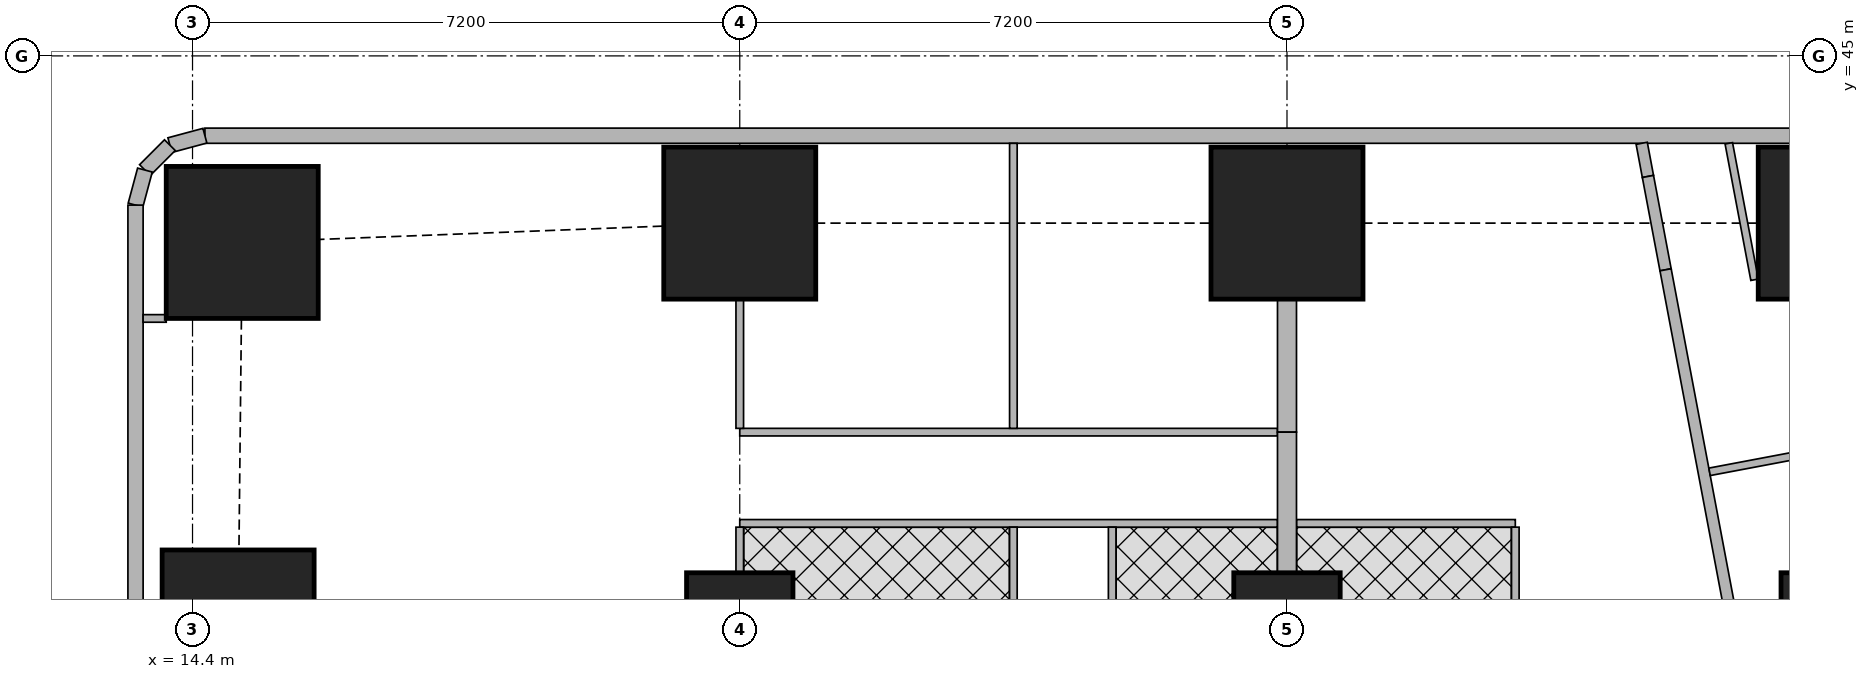
"""IFC4 building model, lengths in metres.
Left out: names, types, materials, properties, quantities, classifications, styles, units other than length and angle.
Written with IfcOpenShell. Run it as: python <this file> out.ifc"""

import sys

from ifc_helpers import new_model, si_unit, direction, frame, frame_2d, origin, origin_2d, place, context, subcontext, project, spatial, rectangle, extrude, element, fill, save


model = new_model("IFC4")
c1 = context("Model", 3, precision=1e-05, world=origin(), true_north=direction((0.0, 1.0)))
c2 = subcontext(c1, "Body", "Model", "MODEL_VIEW")
j1 = project(units=[si_unit("LENGTHUNIT", "METRE"), si_unit("PLANEANGLEUNIT", "RADIAN")], contexts=[c1])
p1 = place(None, origin())
s1 = spatial("IfcSite", under=j1, at=p1, CompositionType="ELEMENT")
p2 = place(p1, origin())
s2 = spatial("IfcBuilding", under=s1, at=p2, CompositionType="ELEMENT")
p3 = place(p2, frame((0.0, 0.0, 274.1)))
s3 = spatial("IfcBuildingStorey", under=s2, at=p3, CompositionType="ELEMENT", Elevation=274.1)
p4 = place(p3, frame((15.0, 37.5, 0.0), z_axis=(0.0, 0.0, 1.0), x_axis=(1.0, 0.0, 0.0)))
e1 = element("IfcColumn", 1, at=p4, inside=s3, PredefinedType="COLUMN", context=c2, shape_type="SweptSolid", body=[
    extrude(rectangle(XDim=2.0, YDim=2.0, at=origin_2d()), origin(), (0.0, 0.0, 1.0), 3.75),
])
for number, where, z_axis, x_axis in (
    (2, (21.6, 37.5, 0.0), (0.0, 0.0, 1.0), (1.0, 0.0, 0.0)),
    (3, (28.8, 37.5, 0.0), (0.0, 0.0, 1.0), (1.0, 0.0, 0.0)),
    (4, (36.0, 37.5, 0.0), (0.0, 0.0, 1.0), (1.0, 0.0, 0.0)),
):
    element("IfcColumn", number, at=place(p3, frame(where, z_axis=z_axis, x_axis=x_axis)), inside=s3, PredefinedType="COLUMN", context=c2, shape_type="SweptSolid", body=[
        extrude(rectangle(XDim=1.4, YDim=1.4, at=origin_2d()), origin(), (0.0, 0.0, 1.0), 3.75),
    ])
for number, where, z_axis, x_axis in (
    (5, (15.054, 42.546, 0.0), (0.0, 0.0, 1.0), (1.0, 0.0, 0.0)),
    (6, (21.6, 42.8, 0.0), (0.0, 0.0, 1.0), (1.0, 0.0, 0.0)),
    (7, (28.8, 42.8, 0.0), (0.0, 0.0, 1.0), (1.0, 0.0, 0.0)),
    (8, (36.0, 42.8, 0.0), (0.0, 0.0, 1.0), (1.0, 0.0, 0.0)),
):
    element("IfcColumn", number, at=place(p3, frame(where, z_axis=z_axis, x_axis=x_axis)), inside=s3, PredefinedType="COLUMN", context=c2, shape_type="SweptSolid", body=[
        extrude(rectangle(XDim=2.0, YDim=2.0, at=origin_2d()), origin(), (0.0, 0.0, 1.0), 3.75),
    ])
p5 = place(p3, frame((42.103, 43.95, 0.0), z_axis=(0.0, 0.0, 1.0), x_axis=(-1.0, 0.0, 0.0)))
e9 = element("IfcWall", 9, at=p5, inside=s3, PredefinedType="SOLIDWALL", context=c2, shape_type="SweptSolid", body=[
    extrude(rectangle(XDim=27.54, YDim=0.2, at=frame_2d((13.77, 0.0))), origin(), (0.0, 0.0, 1.0), 3.5),
])
p6 = place(p5, frame((10.603, 0.0, 0.9)))
e10 = element("IfcOpeningElement", 10, at=p6, cuts=e9, PredefinedType="OPENING", context=c2, shape_type="SweptSolid", body=[
    extrude(rectangle(XDim=1.8, YDim=1.5, at=frame_2d((0.9, 0.75))), frame((0.0, 0.11, 0.0), z_axis=(0.0, -1.0, 0.0), x_axis=(1.0, 0.0, 0.0)), (0.0, 0.0, 1.0), 0.22),
])
p7 = place(p5, frame((14.203, 0.0, 0.9)))
e11 = element("IfcOpeningElement", 11, at=p7, cuts=e9, PredefinedType="OPENING", context=c2, shape_type="SweptSolid", body=[
    extrude(rectangle(XDim=1.8, YDim=1.5, at=frame_2d((0.9, 0.75))), frame((0.0, 0.11, 0.0), z_axis=(0.0, -1.0, 0.0), x_axis=(1.0, 0.0, 0.0)), (0.0, 0.0, 1.0), 0.22),
])
p8 = place(p5, frame((17.803, 0.0, 0.9)))
e12 = element("IfcOpeningElement", 12, at=p8, cuts=e9, PredefinedType="OPENING", context=c2, shape_type="SweptSolid", body=[
    extrude(rectangle(XDim=1.8, YDim=1.5, at=frame_2d((0.9, 0.75))), frame((0.0, 0.11, 0.0), z_axis=(0.0, -1.0, 0.0), x_axis=(1.0, 0.0, 0.0)), (0.0, 0.0, 1.0), 0.22),
])
p9 = place(p5, frame((22.822, 0.0, 0.9)))
e13 = element("IfcOpeningElement", 13, at=p9, cuts=e9, PredefinedType="OPENING", context=c2, shape_type="SweptSolid", body=[
    extrude(rectangle(XDim=2.4, YDim=1.5, at=frame_2d((1.2, 0.75))), frame((0.0, 0.11, 0.0), z_axis=(0.0, -1.0, 0.0), x_axis=(1.0, 0.0, 0.0)), (0.0, 0.0, 1.0), 0.22),
])
p10 = place(p3, frame((14.563, 43.95, 0.0), z_axis=(0.0, 0.0, 1.0), x_axis=(-0.965655254015, -0.259826731483, 0.0)))
e14 = element("IfcWall", 14, at=p10, inside=s3, PredefinedType="SOLIDWALL", context=c2, shape_type="SweptSolid", body=[
    extrude(rectangle(XDim=0.477, YDim=0.2, at=frame_2d((0.239, 0.0))), origin(), (0.0, 0.0, 1.0), 3.5),
])
p11 = place(p3, frame((14.102, 43.826, 0.0), z_axis=(0.0, 0.0, 1.0), x_axis=(-0.707369890659, -0.706843573776, 0.0)))
e15 = element("IfcWall", 15, at=p11, inside=s3, PredefinedType="SOLIDWALL", context=c2, shape_type="SweptSolid", body=[
    extrude(rectangle(XDim=0.464, YDim=0.2, at=frame_2d((0.232, 0.0))), origin(), (0.0, 0.0, 1.0), 3.5),
])
p12 = place(p3, frame((13.774, 43.498, 0.0), z_axis=(0.0, 0.0, 1.0), x_axis=(-0.259826731483, -0.965655254015, 0.0)))
e16 = element("IfcWall", 16, at=p12, inside=s3, PredefinedType="SOLIDWALL", context=c2, shape_type="SweptSolid", body=[
    extrude(rectangle(XDim=0.477, YDim=0.2, at=frame_2d((0.239, 0.0))), origin(), (0.0, 0.0, 1.0), 3.5),
])
p13 = place(p3, frame((13.65, 43.037, 0.0), z_axis=(0.0, 0.0, 1.0), x_axis=(0.0, -1.0, 0.0)))
e17 = element("IfcWall", 17, at=p13, inside=s3, PredefinedType="SOLIDWALL", context=c2, shape_type="SweptSolid", body=[
    extrude(rectangle(XDim=35.374, YDim=0.2, at=frame_2d((17.687, 0.0))), origin(), (0.0, 0.0, 1.0), 3.5),
])
p14 = place(p13, frame((1.959, 0.0, 0.9)))
e18 = element("IfcOpeningElement", 18, at=p14, cuts=e17, PredefinedType="OPENING", context=c2, shape_type="SweptSolid", body=[
    extrude(rectangle(XDim=1.8, YDim=1.5, at=frame_2d((0.9, 0.75))), frame((0.0, 0.11, 0.0), z_axis=(0.0, -1.0, 0.0), x_axis=(1.0, 0.0, 0.0)), (0.0, 0.0, 1.0), 0.22),
])
p15 = place(p3, frame((33.467, 43.85, 0.0), z_axis=(0.0, 0.0, 1.0), x_axis=(0.184886516626, -0.982759877066, 0.0)))
e19 = element("IfcWall", 19, at=p15, inside=s3, PredefinedType="SOLIDWALL", context=c2, shape_type="SweptSolid", body=[
    extrude(rectangle(XDim=0.444, YDim=0.15, at=frame_2d((0.222, 0.0))), origin(), (0.0, 0.0, 1.0), 3.5),
])
p16 = place(p3, frame((33.549, 43.414, 0.0), z_axis=(0.0, 0.0, 1.0), x_axis=(0.185585816539, -0.982628060204, 0.0)))
e20 = element("IfcWall", 20, at=p16, inside=s3, PredefinedType="SOLIDWALL", context=c2, shape_type="SweptSolid", body=[
    extrude(rectangle(XDim=1.25, YDim=0.15, at=frame_2d((0.625, 0.0))), origin(), (0.0, 0.0, 1.0), 2.05),
])
p17 = place(p3, frame((33.781, 42.186, 0.0), z_axis=(0.0, 0.0, 1.0), x_axis=(0.185593518645, -0.9826266055, 0.0)))
e21 = element("IfcWall", 21, at=p17, inside=s3, PredefinedType="SOLIDWALL", context=c2, shape_type="SweptSolid", body=[
    extrude(rectangle(XDim=35.961, YDim=0.15, at=frame_2d((17.98, 0.0))), origin(), (0.0, 0.0, 1.0), 2.5),
])
p18 = place(p17, frame((11.76, 0.0, 0.0)))
e22 = element("IfcOpeningElement", 22, at=p18, cuts=e21, PredefinedType="OPENING", context=c2, shape_type="SweptSolid", body=[
    extrude(rectangle(XDim=1.0, YDim=2.1, at=frame_2d((0.5, 1.05))), frame((0.0, 0.085, 0.0), z_axis=(0.0, -1.0, 0.0), x_axis=(1.0, 0.0, 0.0)), (0.0, 0.0, 1.0), 0.17),
])
p19 = place(p17, frame((15.576, 0.0, 0.0)))
e23 = element("IfcOpeningElement", 23, at=p19, cuts=e21, PredefinedType="OPENING", context=c2, shape_type="SweptSolid", body=[
    extrude(rectangle(XDim=1.0, YDim=2.1, at=frame_2d((0.5, 1.05))), frame((0.0, 0.085, 0.0), z_axis=(0.0, -1.0, 0.0), x_axis=(1.0, 0.0, 0.0)), (0.0, 0.0, 1.0), 0.17),
])
p20 = place(p17, frame((30.502, 0.0, 0.0)))
e24 = element("IfcOpeningElement", 24, at=p20, cuts=e21, PredefinedType="OPENING", context=c2, shape_type="SweptSolid", body=[
    extrude(rectangle(XDim=1.0, YDim=2.1, at=frame_2d((0.5, 1.05))), frame((0.0, 0.085, 0.0), z_axis=(0.0, -1.0, 0.0), x_axis=(1.0, 0.0, 0.0)), (0.0, 0.0, 1.0), 0.17),
])
p21 = place(p3, frame((34.952, 42.055, 0.0), z_axis=(0.0, 0.0, 1.0), x_axis=(-0.185490642006, 0.98264603074, 0.0)))
e25 = element("IfcWall", 25, at=p21, inside=s3, PredefinedType="PARTITIONING", context=c2, shape_type="SweptSolid", body=[
    extrude(rectangle(XDim=1.827, YDim=0.1, at=frame_2d((0.914, 0.0))), origin(), (0.0, 0.0, 1.0), 2.05),
])
p22 = place(p3, frame((37.823, 40.182, 0.0), z_axis=(0.0, 0.0, 1.0), x_axis=(-0.98263926043, -0.185526504472, 0.0)))
e26 = element("IfcWall", 26, at=p22, inside=s3, PredefinedType="PARTITIONING", context=c2, shape_type="SweptSolid", body=[
    extrude(rectangle(XDim=3.524, YDim=0.1, at=frame_2d((1.762, 0.0))), origin(), (0.0, 0.0, 1.0), 3.5),
])
p23 = place(p3, frame((14.054, 41.546, 0.0), z_axis=(0.0, 0.0, 1.0), x_axis=(-1.0, 0.0, 0.0)))
e27 = element("IfcWall", 27, at=p23, inside=s3, PredefinedType="PARTITIONING", context=c2, shape_type="SweptSolid", body=[
    extrude(rectangle(XDim=0.304, YDim=0.1, at=frame_2d((0.152, 0.0))), origin(), (0.0, 0.0, 1.0), 3.5),
])
p24 = place(p3, frame((21.6, 40.05, 0.0), z_axis=(0.0, 0.0, 1.0), x_axis=(1.0, 0.0, 0.0)))
e28 = element("IfcWall", 28, at=p24, inside=s3, PredefinedType="PARTITIONING", context=c2, shape_type="SweptSolid", body=[
    extrude(rectangle(XDim=7.075, YDim=0.1, at=frame_2d((3.538, 0.0))), origin(), (0.0, 0.0, 1.0), 3.5),
])
p25 = place(p24, frame((0.2, 0.0, 0.0)))
e29 = element("IfcOpeningElement", 29, at=p25, cuts=e28, PredefinedType="OPENING", context=c2, shape_type="SweptSolid", body=[
    extrude(rectangle(XDim=0.9, YDim=2.1, at=frame_2d((0.45, 1.05))), frame((0.0, 0.06, 0.0), z_axis=(0.0, -1.0, 0.0), x_axis=(1.0, 0.0, 0.0)), (0.0, 0.0, 1.0), 0.12),
])
p26 = place(p24, frame((3.8, 0.0, 0.0)))
e30 = element("IfcOpeningElement", 30, at=p26, cuts=e28, PredefinedType="OPENING", context=c2, shape_type="SweptSolid", body=[
    extrude(rectangle(XDim=0.9, YDim=2.1, at=frame_2d((0.45, 1.05))), frame((0.0, 0.06, 0.0), z_axis=(0.0, -1.0, 0.0), x_axis=(1.0, 0.0, 0.0)), (0.0, 0.0, 1.0), 0.12),
])
p27 = place(p3, frame((21.6, 38.85, 0.0), z_axis=(0.0, 0.0, 1.0), x_axis=(1.0, 0.0, 0.0)))
e31 = element("IfcWall", 31, at=p27, inside=s3, PredefinedType="PARTITIONING", context=c2, shape_type="SweptSolid", body=[
    extrude(rectangle(XDim=7.075, YDim=0.1, at=frame_2d((3.538, 0.0))), origin(), (0.0, 0.0, 1.0), 3.5),
])
p28 = place(p27, frame((1.35, 0.0, 0.0)))
e32 = element("IfcOpeningElement", 32, at=p28, cuts=e31, PredefinedType="OPENING", context=c2, shape_type="SweptSolid", body=[
    extrude(rectangle(XDim=0.9, YDim=2.1, at=frame_2d((0.45, 1.05))), frame((0.0, 0.06, 0.0), z_axis=(0.0, -1.0, 0.0), x_axis=(1.0, 0.0, 0.0)), (0.0, 0.0, 1.0), 0.12),
])
p29 = place(p27, frame((5.55, 0.0, 0.0)))
e33 = element("IfcOpeningElement", 33, at=p29, cuts=e31, PredefinedType="OPENING", context=c2, shape_type="SweptSolid", body=[
    extrude(rectangle(XDim=0.9, YDim=2.1, at=frame_2d((0.45, 1.05))), frame((0.0, 0.06, 0.0), z_axis=(0.0, -1.0, 0.0), x_axis=(1.0, 0.0, 0.0)), (0.0, 0.0, 1.0), 0.12),
])
p30 = place(p3, frame((21.6, 40.1, 0.0), z_axis=(0.0, 0.0, 1.0), x_axis=(0.0, 1.0, 0.0)))
e34 = element("IfcWall", 34, at=p30, inside=s3, PredefinedType="PARTITIONING", context=c2, shape_type="SweptSolid", body=[
    extrude(rectangle(XDim=1.699, YDim=0.1, at=frame_2d((0.85, 0.0))), origin(), (0.0, 0.0, 1.0), 3.5),
])
p31 = place(p3, frame((25.2, 40.1, 0.0), z_axis=(0.0, 0.0, 1.0), x_axis=(0.0, 1.0, 0.0)))
e35 = element("IfcWall", 35, at=p31, inside=s3, PredefinedType="PARTITIONING", context=c2, shape_type="SweptSolid", body=[
    extrude(rectangle(XDim=3.75, YDim=0.1, at=frame_2d((1.875, 0.0))), origin(), (0.0, 0.0, 1.0), 2.05),
])
p32 = place(p3, frame((21.6, 38.201, 0.0), z_axis=(0.0, 0.0, 1.0), x_axis=(0.0, 1.0, 0.0)))
e36 = element("IfcWall", 36, at=p32, inside=s3, PredefinedType="PARTITIONING", context=c2, shape_type="SweptSolid", body=[
    extrude(rectangle(XDim=0.599, YDim=0.1, at=frame_2d((0.3, 0.0))), origin(), (0.0, 0.0, 1.0), 3.5),
])
p33 = place(p3, frame((25.2, 36.825, 0.0), z_axis=(0.0, 0.0, 1.0), x_axis=(0.0, 1.0, 0.0)))
e37 = element("IfcWall", 37, at=p33, inside=s3, PredefinedType="PARTITIONING", context=c2, shape_type="SweptSolid", body=[
    extrude(rectangle(XDim=1.975, YDim=0.1, at=frame_2d((0.988, 0.0))), origin(), (0.0, 0.0, 1.0), 3.5),
])
p34 = place(p3, frame((26.5, 36.825, 0.0), z_axis=(0.0, 0.0, 1.0), x_axis=(0.0, 1.0, 0.0)))
e38 = element("IfcWall", 38, at=p34, inside=s3, PredefinedType="PARTITIONING", context=c2, shape_type="SweptSolid", body=[
    extrude(rectangle(XDim=1.975, YDim=0.1, at=frame_2d((0.988, 0.0))), origin(), (0.0, 0.0, 1.0), 3.5),
])
p35 = place(p34, frame((0.525, 0.0, 0.0)))
e39 = element("IfcOpeningElement", 39, at=p35, cuts=e38, PredefinedType="OPENING", context=c2, shape_type="SweptSolid", body=[
    extrude(rectangle(XDim=0.9, YDim=2.1, at=frame_2d((0.45, 1.05))), frame((0.0, 0.06, 0.0), z_axis=(0.0, -1.0, 0.0), x_axis=(1.0, 0.0, 0.0)), (0.0, 0.0, 1.0), 0.12),
])
p36 = place(p3, frame((28.925, 38.85, 0.0), z_axis=(0.0, 0.0, 1.0), x_axis=(1.0, 0.0, 0.0)))
e40 = element("IfcWall", 40, at=p36, inside=s3, PredefinedType="PARTITIONING", context=c2, shape_type="SweptSolid", body=[
    extrude(rectangle(XDim=2.879, YDim=0.1, at=frame_2d((1.439, 0.0))), origin(), (0.0, 0.0, 1.0), 3.5),
])
p37 = place(p36, frame((0.925, 0.0, 0.0)))
e41 = element("IfcOpeningElement", 41, at=p37, cuts=e40, PredefinedType="OPENING", context=c2, shape_type="SweptSolid", body=[
    extrude(rectangle(XDim=0.9, YDim=2.1, at=frame_2d((0.45, 1.05))), frame((0.0, 0.06, 0.0), z_axis=(0.0, -1.0, 0.0), x_axis=(1.0, 0.0, 0.0)), (0.0, 0.0, 1.0), 0.12),
])
p38 = place(p3, frame((31.804, 36.825, 0.0), z_axis=(0.0, 0.0, 1.0), x_axis=(0.0, 1.0, 0.0)))
e42 = element("IfcWall", 42, at=p38, inside=s3, PredefinedType="PARTITIONING", context=c2, shape_type="SweptSolid", body=[
    extrude(rectangle(XDim=1.975, YDim=0.1, at=frame_2d((0.988, 0.0))), origin(), (0.0, 0.0, 1.0), 3.5),
])
p39 = place(p3, frame((28.8, 40.05, 0.0), z_axis=(0.0, 0.0, 1.0), x_axis=(0.0, 1.0, 0.0)))
e43 = element("IfcWall", 43, at=p39, inside=s3, PredefinedType="SOLIDWALL", context=c2, shape_type="SweptSolid", body=[
    extrude(rectangle(XDim=1.749, YDim=0.25, at=frame_2d((0.875, 0.0))), origin(), (0.0, 0.0, 1.0), 3.5),
])
p40 = place(p3, frame((28.8, 38.201, 0.0), z_axis=(0.0, 0.0, 1.0), x_axis=(0.0, 1.0, 0.0)))
e44 = element("IfcWall", 44, at=p40, inside=s3, PredefinedType="SOLIDWALL", context=c2, shape_type="SweptSolid", body=[
    extrude(rectangle(XDim=1.849, YDim=0.25, at=frame_2d((0.925, 0.0))), origin(), (0.0, 0.0, 1.0), 3.5),
])
p41 = place(p6, origin())
e45 = element("IfcWindow", 45, at=p41, inside=s3, PartitioningType="SINGLE_PANEL", PredefinedType="WINDOW", context=c2, shape_type="SweptSolid", body=[
    extrude(rectangle(XDim=1.8, YDim=1.5, at=frame_2d((0.9, 0.75))), frame((0.0, 0.03, 0.0), z_axis=(0.0, -1.0, 0.0), x_axis=(1.0, 0.0, 0.0)), (0.0, 0.0, 1.0), 0.06),
])
fill(e10, e45)
p42 = place(p7, origin())
e46 = element("IfcWindow", 46, at=p42, inside=s3, PartitioningType="SINGLE_PANEL", PredefinedType="WINDOW", context=c2, shape_type="SweptSolid", body=[
    extrude(rectangle(XDim=1.8, YDim=1.5, at=frame_2d((0.9, 0.75))), frame((0.0, 0.03, 0.0), z_axis=(0.0, -1.0, 0.0), x_axis=(1.0, 0.0, 0.0)), (0.0, 0.0, 1.0), 0.06),
])
fill(e11, e46)
p43 = place(p8, origin())
e47 = element("IfcWindow", 47, at=p43, inside=s3, PartitioningType="SINGLE_PANEL", PredefinedType="WINDOW", context=c2, shape_type="SweptSolid", body=[
    extrude(rectangle(XDim=1.8, YDim=1.5, at=frame_2d((0.9, 0.75))), frame((0.0, 0.03, 0.0), z_axis=(0.0, -1.0, 0.0), x_axis=(1.0, 0.0, 0.0)), (0.0, 0.0, 1.0), 0.06),
])
fill(e12, e47)
p44 = place(p9, origin())
e48 = element("IfcWindow", 48, at=p44, inside=s3, PartitioningType="SINGLE_PANEL", PredefinedType="WINDOW", context=c2, shape_type="SweptSolid", body=[
    extrude(rectangle(XDim=2.4, YDim=1.5, at=frame_2d((1.2, 0.75))), frame((0.0, 0.03, 0.0), z_axis=(0.0, -1.0, 0.0), x_axis=(1.0, 0.0, 0.0)), (0.0, 0.0, 1.0), 0.06),
])
fill(e13, e48)
p45 = place(p14, origin())
e49 = element("IfcWindow", 49, at=p45, inside=s3, PartitioningType="SINGLE_PANEL", PredefinedType="WINDOW", context=c2, shape_type="SweptSolid", body=[
    extrude(rectangle(XDim=1.8, YDim=1.5, at=frame_2d((0.9, 0.75))), frame((0.0, 0.03, 0.0), z_axis=(0.0, -1.0, 0.0), x_axis=(1.0, 0.0, 0.0)), (0.0, 0.0, 1.0), 0.06),
])
fill(e18, e49)
p46 = place(p25, origin())
e50 = element("IfcDoor", 50, at=p46, inside=s3, OperationType="SINGLE_SWING_LEFT", PredefinedType="DOOR", context=c2, shape_type="SweptSolid", body=[
    extrude(rectangle(XDim=0.9, YDim=2.1, at=frame_2d((0.45, 1.05))), frame((0.0, 0.025, 0.0), z_axis=(0.0, -1.0, 0.0), x_axis=(1.0, 0.0, 0.0)), (0.0, 0.0, 1.0), 0.05),
])
fill(e29, e50)
p47 = place(p26, origin())
e51 = element("IfcDoor", 51, at=p47, inside=s3, OperationType="SINGLE_SWING_LEFT", PredefinedType="DOOR", context=c2, shape_type="SweptSolid", body=[
    extrude(rectangle(XDim=0.9, YDim=2.1, at=frame_2d((0.45, 1.05))), frame((0.0, 0.025, 0.0), z_axis=(0.0, -1.0, 0.0), x_axis=(1.0, 0.0, 0.0)), (0.0, 0.0, 1.0), 0.05),
])
fill(e30, e51)
p48 = place(p28, origin())
e52 = element("IfcDoor", 52, at=p48, inside=s3, OperationType="SINGLE_SWING_RIGHT", PredefinedType="DOOR", context=c2, shape_type="SweptSolid", body=[
    extrude(rectangle(XDim=0.9, YDim=2.1, at=frame_2d((0.45, 1.05))), frame((0.0, 0.025, 0.0), z_axis=(0.0, -1.0, 0.0), x_axis=(1.0, 0.0, 0.0)), (0.0, 0.0, 1.0), 0.05),
])
fill(e32, e52)
p49 = place(p29, origin())
e53 = element("IfcDoor", 53, at=p49, inside=s3, OperationType="SINGLE_SWING_LEFT", PredefinedType="DOOR", context=c2, shape_type="SweptSolid", body=[
    extrude(rectangle(XDim=0.9, YDim=2.1, at=frame_2d((0.45, 1.05))), frame((0.0, 0.025, 0.0), z_axis=(0.0, -1.0, 0.0), x_axis=(1.0, 0.0, 0.0)), (0.0, 0.0, 1.0), 0.05),
])
fill(e33, e53)
p50 = place(p35, origin())
e54 = element("IfcDoor", 54, at=p50, inside=s3, OperationType="SINGLE_SWING_LEFT", PredefinedType="DOOR", context=c2, shape_type="SweptSolid", body=[
    extrude(rectangle(XDim=0.9, YDim=2.1, at=frame_2d((0.45, 1.05))), frame((0.0, 0.025, 0.0), z_axis=(0.0, -1.0, 0.0), x_axis=(1.0, 0.0, 0.0)), (0.0, 0.0, 1.0), 0.05),
])
fill(e39, e54)
p51 = place(p37, origin())
e55 = element("IfcDoor", 55, at=p51, inside=s3, OperationType="SINGLE_SWING_RIGHT", PredefinedType="DOOR", context=c2, shape_type="SweptSolid", body=[
    extrude(rectangle(XDim=0.9, YDim=2.1, at=frame_2d((0.45, 1.05))), frame((0.0, 0.025, 0.0), z_axis=(0.0, -1.0, 0.0), x_axis=(1.0, 0.0, 0.0)), (0.0, 0.0, 1.0), 0.05),
])
fill(e41, e55)
save(model, sys.argv[1])
